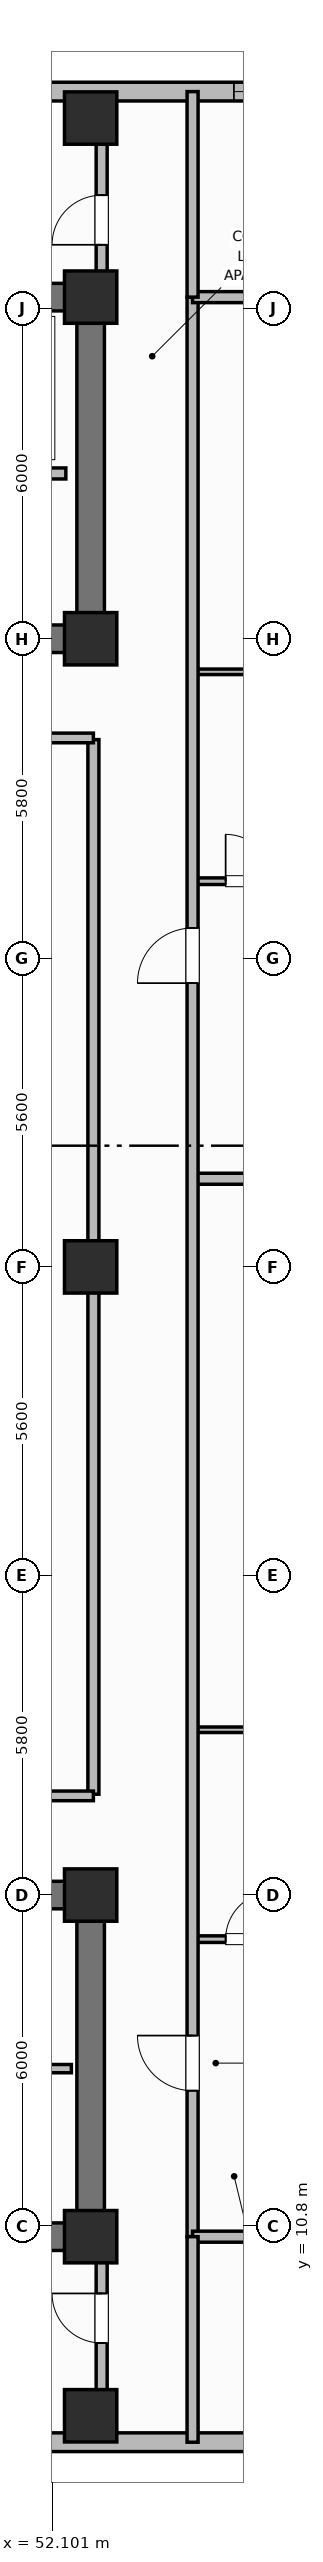
"""IFC4 building model, lengths in metres.
Left out: names, types, materials, properties, quantities, classifications, styles, units other than length and angle.
Written with IfcOpenShell. Run it as: python <this file> out.ifc"""

import sys

from ifc_helpers import new_model, si_unit, direction, frame, frame_2d, origin, origin_2d, place, context, subcontext, project, spatial, rectangle, extrude, element, fill, save


model = new_model("IFC4")
c1 = context("Model", 3, precision=1e-05, world=origin(), true_north=direction((0.0, 1.0)))
c2 = subcontext(c1, "Body", "Model", "MODEL_VIEW")
j1 = project(units=[si_unit("LENGTHUNIT", "METRE"), si_unit("PLANEANGLEUNIT", "RADIAN")], contexts=[c1])
p1 = place(None, origin())
s1 = spatial("IfcSite", under=j1, at=p1, CompositionType="ELEMENT")
p2 = place(p1, origin())
s2 = spatial("IfcBuilding", under=s1, at=p2, CompositionType="ELEMENT")
p3 = place(p2, frame((0.0, 0.0, 158.9)))
s3 = spatial("IfcBuildingStorey", under=s2, at=p3, CompositionType="ELEMENT", Elevation=158.9)
p4 = place(p3, frame((52.8, 10.6, 0.0), z_axis=(0.0, 0.0, 1.0), x_axis=(-1.0, 0.0, 0.0)))
e1 = element("IfcWall", 1, at=p4, inside=s3, PredefinedType="SHEAR", context=c2, shape_type="SweptSolid", body=[
    extrude(rectangle(XDim=27.2, YDim=0.5, at=frame_2d((13.6, 0.0))), origin(), (0.0, 0.0, 1.0), 3.7),
])
p5 = place(p3, frame((52.8, 10.85, 0.0), z_axis=(0.0, 0.0, 1.0), x_axis=(0.0, 1.0, 0.0)))
e2 = element("IfcWall", 2, at=p5, inside=s3, PredefinedType="SHEAR", context=c2, shape_type="SweptSolid", body=[
    extrude(rectangle(XDim=5.7, YDim=0.5, at=frame_2d((2.85, 0.0))), origin(), (0.0, 0.0, 1.0), 3.7),
])
p6 = place(p3, frame((25.6, 16.8, 0.0), z_axis=(0.0, 0.0, 1.0), x_axis=(1.0, 0.0, 0.0)))
e3 = element("IfcWall", 3, at=p6, inside=s3, PredefinedType="SHEAR", context=c2, shape_type="SweptSolid", body=[
    extrude(rectangle(XDim=27.2, YDim=0.5, at=frame_2d((13.6, 0.0))), origin(), (0.0, 0.0, 1.0), 3.7),
])
p7 = place(p6, frame((1.7, 0.0, 0.0)))
e4 = element("IfcOpeningElement", 4, at=p7, cuts=e3, PredefinedType="OPENING", context=c2, shape_type="SweptSolid", body=[
    extrude(rectangle(XDim=1.1, YDim=2.15, at=frame_2d((0.55, 1.075))), frame((0.0, 0.26, 0.0), z_axis=(0.0, -1.0, 0.0), x_axis=(1.0, 0.0, 0.0)), (0.0, 0.0, 1.0), 0.52),
])
p8 = place(p6, frame((4.45, 0.0, 0.0)))
e5 = element("IfcOpeningElement", 5, at=p8, cuts=e3, PredefinedType="OPENING", context=c2, shape_type="SweptSolid", body=[
    extrude(rectangle(XDim=0.85, YDim=2.1, at=frame_2d((0.425, 1.05))), frame((0.0, 0.26, 0.0), z_axis=(0.0, -1.0, 0.0), x_axis=(1.0, 0.0, 0.0)), (0.0, 0.0, 1.0), 0.52),
])
p9 = place(p6, frame((6.5, 0.0, 0.0)))
e6 = element("IfcOpeningElement", 6, at=p9, cuts=e3, PredefinedType="OPENING", context=c2, shape_type="SweptSolid", body=[
    extrude(rectangle(XDim=0.85, YDim=2.1, at=frame_2d((0.425, 1.05))), frame((0.0, 0.26, 0.0), z_axis=(0.0, -1.0, 0.0), x_axis=(1.0, 0.0, 0.0)), (0.0, 0.0, 1.0), 0.52),
])
p10 = place(p6, frame((13.0, 0.0, 0.0)))
e7 = element("IfcOpeningElement", 7, at=p10, cuts=e3, PredefinedType="OPENING", context=c2, shape_type="SweptSolid", body=[
    extrude(rectangle(XDim=1.2, YDim=2.15, at=frame_2d((0.6, 1.075))), frame((0.0, 0.26, 0.0), z_axis=(0.0, -1.0, 0.0), x_axis=(1.0, 0.0, 0.0)), (0.0, 0.0, 1.0), 0.52),
])
p11 = place(p6, frame((19.8, 0.0, 0.0)))
e8 = element("IfcOpeningElement", 8, at=p11, cuts=e3, PredefinedType="OPENING", context=c2, shape_type="SweptSolid", body=[
    extrude(rectangle(XDim=0.85, YDim=2.1, at=frame_2d((0.425, 1.05))), frame((0.0, 0.26, 0.0), z_axis=(0.0, -1.0, 0.0), x_axis=(1.0, 0.0, 0.0)), (0.0, 0.0, 1.0), 0.52),
])
p12 = place(p6, frame((24.2, 0.0, 0.0)))
e9 = element("IfcOpeningElement", 9, at=p12, cuts=e3, PredefinedType="OPENING", context=c2, shape_type="SweptSolid", body=[
    extrude(rectangle(XDim=0.85, YDim=2.1, at=frame_2d((0.425, 1.05))), frame((0.0, 0.26, 0.0), z_axis=(0.0, -1.0, 0.0), x_axis=(1.0, 0.0, 0.0)), (0.0, 0.0, 1.0), 0.52),
])
p13 = place(p3, frame((25.6, 45.8, 0.0), z_axis=(0.0, 0.0, 1.0), x_axis=(1.0, 0.0, 0.0)))
e10 = element("IfcWall", 10, at=p13, inside=s3, PredefinedType="SHEAR", context=c2, shape_type="SweptSolid", body=[
    extrude(rectangle(XDim=27.2, YDim=0.5, at=frame_2d((13.6, 0.0))), origin(), (0.0, 0.0, 1.0), 3.7),
])
p14 = place(p3, frame((52.8, 39.85, 0.0), z_axis=(0.0, 0.0, 1.0), x_axis=(0.0, 1.0, 0.0)))
e11 = element("IfcWall", 11, at=p14, inside=s3, PredefinedType="SHEAR", context=c2, shape_type="SweptSolid", body=[
    extrude(rectangle(XDim=5.7, YDim=0.5, at=frame_2d((2.85, 0.0))), origin(), (0.0, 0.0, 1.0), 3.7),
])
p15 = place(p3, frame((52.8, 39.6, 0.0), z_axis=(0.0, 0.0, 1.0), x_axis=(-1.0, 0.0, 0.0)))
e12 = element("IfcWall", 12, at=p15, inside=s3, PredefinedType="SHEAR", context=c2, shape_type="SweptSolid", body=[
    extrude(rectangle(XDim=27.2, YDim=0.5, at=frame_2d((13.6, 0.0))), origin(), (0.0, 0.0, 1.0), 3.7),
])
p16 = place(p15, frame((24.3, 0.0, 0.0)))
e13 = element("IfcOpeningElement", 13, at=p16, cuts=e12, PredefinedType="OPENING", context=c2, shape_type="SweptSolid", body=[
    extrude(rectangle(XDim=1.1, YDim=2.15, at=frame_2d((0.55, 1.075))), frame((0.0, 0.26, 0.0), z_axis=(0.0, -1.0, 0.0), x_axis=(1.0, 0.0, 0.0)), (0.0, 0.0, 1.0), 0.52),
])
p17 = place(p15, frame((21.85, 0.0, 0.0)))
e14 = element("IfcOpeningElement", 14, at=p17, cuts=e12, PredefinedType="OPENING", context=c2, shape_type="SweptSolid", body=[
    extrude(rectangle(XDim=0.85, YDim=2.1, at=frame_2d((0.425, 1.05))), frame((0.0, 0.26, 0.0), z_axis=(0.0, -1.0, 0.0), x_axis=(1.0, 0.0, 0.0)), (0.0, 0.0, 1.0), 0.52),
])
p18 = place(p15, frame((19.85, 0.0, 0.0)))
e15 = element("IfcOpeningElement", 15, at=p18, cuts=e12, PredefinedType="OPENING", context=c2, shape_type="SweptSolid", body=[
    extrude(rectangle(XDim=0.85, YDim=2.1, at=frame_2d((0.425, 1.05))), frame((0.0, 0.26, 0.0), z_axis=(0.0, -1.0, 0.0), x_axis=(1.0, 0.0, 0.0)), (0.0, 0.0, 1.0), 0.52),
])
p19 = place(p15, frame((15.1, 0.0, 0.0)))
e16 = element("IfcOpeningElement", 16, at=p19, cuts=e12, PredefinedType="OPENING", context=c2, shape_type="SweptSolid", body=[
    extrude(rectangle(XDim=1.2, YDim=2.15, at=frame_2d((0.6, 1.075))), frame((0.0, 0.26, 0.0), z_axis=(0.0, -1.0, 0.0), x_axis=(1.0, 0.0, 0.0)), (0.0, 0.0, 1.0), 0.52),
])
p20 = place(p15, frame((12.6, 0.0, 0.0)))
e17 = element("IfcOpeningElement", 17, at=p20, cuts=e12, PredefinedType="OPENING", context=c2, shape_type="SweptSolid", body=[
    extrude(rectangle(XDim=0.85, YDim=2.1, at=frame_2d((0.425, 1.05))), frame((0.0, 0.26, 0.0), z_axis=(0.0, -1.0, 0.0), x_axis=(1.0, 0.0, 0.0)), (0.0, 0.0, 1.0), 0.52),
])
p21 = place(p15, frame((10.85, 0.0, 0.0)))
e18 = element("IfcOpeningElement", 18, at=p21, cuts=e12, PredefinedType="OPENING", context=c2, shape_type="SweptSolid", body=[
    extrude(rectangle(XDim=0.85, YDim=2.1, at=frame_2d((0.425, 1.05))), frame((0.0, 0.26, 0.0), z_axis=(0.0, -1.0, 0.0), x_axis=(1.0, 0.0, 0.0)), (0.0, 0.0, 1.0), 0.52),
])
p22 = place(p15, frame((7.35, 0.0, 0.0)))
e19 = element("IfcOpeningElement", 19, at=p22, cuts=e12, PredefinedType="OPENING", context=c2, shape_type="SweptSolid", body=[
    extrude(rectangle(XDim=0.85, YDim=2.1, at=frame_2d((0.425, 1.05))), frame((0.0, 0.26, 0.0), z_axis=(0.0, -1.0, 0.0), x_axis=(1.0, 0.0, 0.0)), (0.0, 0.0, 1.0), 0.52),
])
p23 = place(p15, frame((5.35, 0.0, 0.0)))
e20 = element("IfcOpeningElement", 20, at=p23, cuts=e12, PredefinedType="OPENING", context=c2, shape_type="SweptSolid", body=[
    extrude(rectangle(XDim=0.85, YDim=2.1, at=frame_2d((0.425, 1.05))), frame((0.0, 0.26, 0.0), z_axis=(0.0, -1.0, 0.0), x_axis=(1.0, 0.0, 0.0)), (0.0, 0.0, 1.0), 0.52),
])
p24 = place(p15, frame((2.0, 0.0, 0.0)))
e21 = element("IfcOpeningElement", 21, at=p24, cuts=e12, PredefinedType="OPENING", context=c2, shape_type="SweptSolid", body=[
    extrude(rectangle(XDim=0.85, YDim=2.1, at=frame_2d((0.425, 1.05))), frame((0.0, 0.26, 0.0), z_axis=(0.0, -1.0, 0.0), x_axis=(1.0, 0.0, 0.0)), (0.0, 0.0, 1.0), 0.52),
])
for number, where, z_axis, x_axis in (
    (22, (52.8, 10.6, 0.0), (0.0, 0.0, 1.0), (1.0, 0.0, 0.0)),
    (23, (52.8, 16.8, 0.0), (0.0, 0.0, 1.0), (1.0, 0.0, 0.0)),
    (24, (52.8, 39.6, 0.0), (0.0, 0.0, 1.0), (1.0, 0.0, 0.0)),
    (25, (52.8, 45.8, 0.0), (0.0, 0.0, 1.0), (1.0, 0.0, 0.0)),
    (26, (52.8, 28.2, 0.0), (0.0, 0.0, 1.0), (1.0, 0.0, 0.0)),
    (27, (52.8, 7.35, 0.0), (0.0, 0.0, 1.0), (1.0, 0.0, 0.0)),
    (28, (52.8, 49.05, 0.0), (0.0, 0.0, 1.0), (1.0, 0.0, 0.0)),
):
    element("IfcColumn", number, at=place(p3, frame(where, z_axis=z_axis, x_axis=x_axis)), inside=s3, PredefinedType="COLUMN", context=c2, shape_type="SweptSolid", body=[
        extrude(rectangle(XDim=0.95, YDim=0.95, at=origin_2d()), origin(), (0.0, 0.0, 1.0), 3.7),
    ])
p25 = place(p3, frame((51.25, 6.87, 0.0), z_axis=(0.0, 0.0, 1.0), x_axis=(1.0, 0.0, 0.0)))
e29 = element("IfcWall", 29, at=p25, inside=s3, PredefinedType="SOLIDWALL", context=c2, shape_type="SweptSolid", body=[
    extrude(rectangle(XDim=6.95, YDim=0.34, at=frame_2d((3.475, 0.0))), origin(), (0.0, 0.0, 1.0), 2.72),
])
p26 = place(p3, frame((58.2, 49.53, 0.0), z_axis=(0.0, 0.0, 1.0), x_axis=(-1.0, 0.0, 0.0)))
e30 = element("IfcWall", 30, at=p26, inside=s3, PredefinedType="SOLIDWALL", context=c2, shape_type="SweptSolid", body=[
    extrude(rectangle(XDim=15.8, YDim=0.34, at=frame_2d((7.9, 0.0))), origin(), (0.0, 0.0, 1.0), 2.72),
])
p27 = place(p26, frame((1.4, 0.0, 0.75)))
e31 = element("IfcOpeningElement", 31, at=p27, cuts=e30, PredefinedType="OPENING", context=c2, shape_type="SweptSolid", body=[
    extrude(rectangle(XDim=1.4, YDim=1.85, at=frame_2d((0.7, 0.925))), frame((0.0, 0.18, 0.0), z_axis=(0.0, -1.0, 0.0), x_axis=(1.0, 0.0, 0.0)), (0.0, 0.0, 1.0), 0.36),
])
p28 = place(p26, frame((7.2, 0.0, 0.75)))
e32 = element("IfcOpeningElement", 32, at=p28, cuts=e30, PredefinedType="OPENING", context=c2, shape_type="SweptSolid", body=[
    extrude(rectangle(XDim=1.4, YDim=1.85, at=frame_2d((0.7, 0.925))), frame((0.0, 0.18, 0.0), z_axis=(0.0, -1.0, 0.0), x_axis=(1.0, 0.0, 0.0)), (0.0, 0.0, 1.0), 0.36),
])
p29 = place(p26, frame((11.15, 0.0, 0.75)))
e33 = element("IfcOpeningElement", 33, at=p29, cuts=e30, PredefinedType="OPENING", context=c2, shape_type="SweptSolid", body=[
    extrude(rectangle(XDim=1.4, YDim=1.85, at=frame_2d((0.7, 0.925))), frame((0.0, 0.18, 0.0), z_axis=(0.0, -1.0, 0.0), x_axis=(1.0, 0.0, 0.0)), (0.0, 0.0, 1.0), 0.36),
])
p30 = place(p3, frame((48.05, 13.65, 0.0), z_axis=(0.0, 0.0, 1.0), x_axis=(1.0, 0.0, 0.0)))
e34 = element("IfcWall", 34, at=p30, inside=s3, PredefinedType="PARTITIONING", context=c2, shape_type="SweptSolid", body=[
    extrude(rectangle(XDim=4.4, YDim=0.15, at=frame_2d((2.2, 0.0))), origin(), (0.0, 0.0, 1.0), 2.55),
])
p31 = place(p30, frame((1.6, 0.0, 0.0)))
e35 = element("IfcOpeningElement", 35, at=p31, cuts=e34, PredefinedType="OPENING", context=c2, shape_type="SweptSolid", body=[
    extrude(rectangle(XDim=0.85, YDim=2.1, at=frame_2d((0.425, 1.05))), frame((0.0, 0.085, 0.0), z_axis=(0.0, -1.0, 0.0), x_axis=(1.0, 0.0, 0.0)), (0.0, 0.0, 1.0), 0.17),
])
p32 = place(p3, frame((52.35, 42.6, 0.0), z_axis=(0.0, 0.0, 1.0), x_axis=(-1.0, 0.0, 0.0)))
e36 = element("IfcWall", 36, at=p32, inside=s3, PredefinedType="PARTITIONING", context=c2, shape_type="SweptSolid", body=[
    extrude(rectangle(XDim=6.5, YDim=0.2, at=frame_2d((3.25, 0.0))), origin(), (0.0, 0.0, 1.0), 2.55),
])
p33 = place(p3, frame((52.85, 18.63, 0.0), z_axis=(0.0, 0.0, 1.0), x_axis=(0.0, 1.0, 0.0)))
e37 = element("IfcWall", 37, at=p33, inside=s3, PredefinedType="PARTITIONING", context=c2, shape_type="SweptSolid", body=[
    extrude(rectangle(XDim=19.14, YDim=0.2, at=frame_2d((9.57, 0.0))), origin(), (0.0, 0.0, 1.0), 2.55),
])
for number, where, z_axis, x_axis in (
    (38, (31.35, 18.6, 0.0), (0.0, 0.0, 1.0), (1.0, 0.0, 0.0)),
    (39, (31.35, 37.8, 0.0), (0.0, 0.0, 1.0), (1.0, 0.0, 0.0)),
):
    element("IfcWall", number, at=place(p3, frame(where, z_axis=z_axis, x_axis=x_axis)), inside=s3, PredefinedType="PARTITIONING", context=c2, shape_type="SweptSolid", body=[
        extrude(rectangle(XDim=21.5, YDim=0.175, at=frame_2d((10.75, 0.0))), origin(), (0.0, 0.0, 1.0), 2.55),
    ])
p34 = place(p3, frame((54.65, 16.0, 0.0), z_axis=(0.0, 0.0, 1.0), x_axis=(1.0, 0.0, 0.0)))
e40 = element("IfcWall", 40, at=p34, inside=s3, PredefinedType="PARTITIONING", context=c2, shape_type="SweptSolid", body=[
    extrude(rectangle(XDim=2.25, YDim=0.12, at=frame_2d((1.125, 0.0))), origin(), (0.0, 0.0, 1.0), 2.55),
])
p35 = place(p34, frame((0.6, 0.0, 0.0)))
e41 = element("IfcOpeningElement", 41, at=p35, cuts=e40, PredefinedType="OPENING", context=c2, shape_type="SweptSolid", body=[
    extrude(rectangle(XDim=0.85, YDim=2.1, at=frame_2d((0.425, 1.05))), frame((0.0, 0.07, 0.0), z_axis=(0.0, -1.0, 0.0), x_axis=(1.0, 0.0, 0.0)), (0.0, 0.0, 1.0), 0.14),
])
p36 = place(p3, frame((54.65, 19.8, 0.0), z_axis=(0.0, 0.0, 1.0), x_axis=(1.0, 0.0, 0.0)))
e42 = element("IfcWall", 42, at=p36, inside=s3, PredefinedType="PARTITIONING", context=c2, shape_type="SweptSolid", body=[
    extrude(rectangle(XDim=2.25, YDim=0.1, at=frame_2d((1.125, 0.0))), origin(), (0.0, 0.0, 1.0), 2.55),
])
p37 = place(p3, frame((54.65, 29.8, 0.0), z_axis=(0.0, 0.0, 1.0), x_axis=(1.0, 0.0, 0.0)))
e43 = element("IfcWall", 43, at=p37, inside=s3, PredefinedType="PARTITIONING", context=c2, shape_type="SweptSolid", body=[
    extrude(rectangle(XDim=6.666, YDim=0.2, at=frame_2d((3.333, 0.0))), origin(), (0.0, 0.0, 1.0), 2.55),
])
p38 = place(p3, frame((54.65, 35.2, 0.0), z_axis=(0.0, 0.0, 1.0), x_axis=(1.0, 0.0, 0.0)))
e44 = element("IfcWall", 44, at=p38, inside=s3, PredefinedType="PARTITIONING", context=c2, shape_type="SweptSolid", body=[
    extrude(rectangle(XDim=2.25, YDim=0.12, at=frame_2d((1.125, 0.0))), origin(), (0.0, 0.0, 1.0), 2.55),
])
p39 = place(p38, frame((0.6, 0.0, 0.0)))
e45 = element("IfcOpeningElement", 45, at=p39, cuts=e44, PredefinedType="OPENING", context=c2, shape_type="SweptSolid", body=[
    extrude(rectangle(XDim=0.85, YDim=2.1, at=frame_2d((0.425, 1.05))), frame((0.0, 0.07, 0.0), z_axis=(0.0, -1.0, 0.0), x_axis=(1.0, 0.0, 0.0)), (0.0, 0.0, 1.0), 0.14),
])
p40 = place(p3, frame((54.65, 39.0, 0.0), z_axis=(0.0, 0.0, 1.0), x_axis=(1.0, 0.0, 0.0)))
e46 = element("IfcWall", 46, at=p40, inside=s3, PredefinedType="PARTITIONING", context=c2, shape_type="SweptSolid", body=[
    extrude(rectangle(XDim=2.25, YDim=0.1, at=frame_2d((1.125, 0.0))), origin(), (0.0, 0.0, 1.0), 2.55),
])
p41 = place(p3, frame((54.65, 10.6, 0.0), z_axis=(0.0, 0.0, 1.0), x_axis=(0.0, 1.0, 0.0)))
e47 = element("IfcWall", 47, at=p41, inside=s3, PredefinedType="PARTITIONING", context=c2, shape_type="SweptSolid", body=[
    extrude(rectangle(XDim=35.2, YDim=0.2, at=frame_2d((17.6, 0.0))), origin(), (0.0, 0.0, 1.0), 2.55),
])
p42 = place(p41, frame((2.65, 0.0, 0.0)))
e48 = element("IfcOpeningElement", 48, at=p42, cuts=e47, PredefinedType="OPENING", context=c2, shape_type="SweptSolid", body=[
    extrude(rectangle(XDim=1.0, YDim=2.15, at=frame_2d((0.5, 1.075))), frame((0.0, 0.11, 0.0), z_axis=(0.0, -1.0, 0.0), x_axis=(1.0, 0.0, 0.0)), (0.0, 0.0, 1.0), 0.22),
])
p43 = place(p41, frame((22.75, 0.0, 0.0)))
e49 = element("IfcOpeningElement", 49, at=p43, cuts=e47, PredefinedType="OPENING", context=c2, shape_type="SweptSolid", body=[
    extrude(rectangle(XDim=1.0, YDim=2.15, at=frame_2d((0.5, 1.075))), frame((0.0, 0.11, 0.0), z_axis=(0.0, -1.0, 0.0), x_axis=(1.0, 0.0, 0.0)), (0.0, 0.0, 1.0), 0.22),
])
for number, where, z_axis, x_axis in (
    (50, (54.65, 10.6, 0.0), (0.0, 0.0, 1.0), (1.0, 0.0, 0.0)),
    (51, (54.65, 45.8, 0.0), (0.0, 0.0, 1.0), (1.0, 0.0, 0.0)),
):
    element("IfcWall", number, at=place(p3, frame(where, z_axis=z_axis, x_axis=x_axis)), inside=s3, PredefinedType="PARTITIONING", context=c2, shape_type="SweptSolid", body=[
        extrude(rectangle(XDim=6.76, YDim=0.2, at=frame_2d((3.38, 0.0))), origin(), (0.0, 0.0, 1.0), 2.55),
    ])
for number, where, z_axis, x_axis in (
    (52, (54.65, 6.87, 0.0), (0.0, 0.0, 1.0), (0.0, 1.0, 0.0)),
    (53, (54.65, 45.8, 0.0), (0.0, 0.0, 1.0), (0.0, 1.0, 0.0)),
):
    element("IfcWall", number, at=place(p3, frame(where, z_axis=z_axis, x_axis=x_axis)), inside=s3, PredefinedType="PARTITIONING", context=c2, shape_type="SweptSolid", body=[
        extrude(rectangle(XDim=3.73, YDim=0.2, at=frame_2d((1.865, 0.0))), origin(), (0.0, 0.0, 1.0), 2.55),
    ])
p44 = place(p3, frame((53.0, 7.82, 0.0), z_axis=(0.0, 0.0, 1.0), x_axis=(0.0, 1.0, 0.0)))
e54 = element("IfcWall", 54, at=p44, inside=s3, PredefinedType="PARTITIONING", context=c2, shape_type="SweptSolid", body=[
    extrude(rectangle(XDim=2.48, YDim=0.2, at=frame_2d((1.24, 0.0))), origin(), (0.0, 0.0, 1.0), 2.55),
])
p45 = place(p44, frame((0.85, 0.0, 0.0)))
e55 = element("IfcOpeningElement", 55, at=p45, cuts=e54, PredefinedType="OPENING", context=c2, shape_type="SweptSolid", body=[
    extrude(rectangle(XDim=0.9, YDim=2.1, at=frame_2d((0.45, 1.05))), frame((0.0, 0.11, 0.0), z_axis=(0.0, -1.0, 0.0), x_axis=(1.0, 0.0, 0.0)), (0.0, 0.0, 1.0), 0.22),
])
p46 = place(p3, frame((53.0, 46.1, 0.0), z_axis=(0.0, 0.0, 1.0), x_axis=(0.0, 1.0, 0.0)))
e56 = element("IfcWall", 56, at=p46, inside=s3, PredefinedType="PARTITIONING", context=c2, shape_type="SweptSolid", body=[
    extrude(rectangle(XDim=2.48, YDim=0.2, at=frame_2d((1.24, 0.0))), origin(), (0.0, 0.0, 1.0), 2.55),
])
p47 = place(p46, frame((0.65, 0.0, 0.0)))
e57 = element("IfcOpeningElement", 57, at=p47, cuts=e56, PredefinedType="OPENING", context=c2, shape_type="SweptSolid", body=[
    extrude(rectangle(XDim=0.9, YDim=2.1, at=frame_2d((0.45, 1.05))), frame((0.0, 0.11, 0.0), z_axis=(0.0, -1.0, 0.0), x_axis=(1.0, 0.0, 0.0)), (0.0, 0.0, 1.0), 0.22),
])
p48 = place(p27, origin())
e58 = element("IfcWindow", 58, at=p48, inside=s3, PartitioningType="SINGLE_PANEL", PredefinedType="WINDOW", context=c2, shape_type="SweptSolid", body=[
    extrude(rectangle(XDim=1.4, YDim=1.85, at=frame_2d((0.7, 0.925))), frame((0.0, 0.03, 0.0), z_axis=(0.0, -1.0, 0.0), x_axis=(1.0, 0.0, 0.0)), (0.0, 0.0, 1.0), 0.06),
])
fill(e31, e58)
p49 = place(p35, origin())
e59 = element("IfcDoor", 59, at=p49, inside=s3, OperationType="SINGLE_SWING_RIGHT", PredefinedType="DOOR", context=c2, shape_type="SweptSolid", body=[
    extrude(rectangle(XDim=0.85, YDim=2.1, at=frame_2d((0.425, 1.05))), frame((0.0, 0.025, 0.0), z_axis=(0.0, -1.0, 0.0), x_axis=(1.0, 0.0, 0.0)), (0.0, 0.0, 1.0), 0.05),
])
fill(e41, e59)
p50 = place(p39, origin())
e60 = element("IfcDoor", 60, at=p50, inside=s3, OperationType="SINGLE_SWING_LEFT", PredefinedType="DOOR", context=c2, shape_type="SweptSolid", body=[
    extrude(rectangle(XDim=0.85, YDim=2.1, at=frame_2d((0.425, 1.05))), frame((0.0, 0.025, 0.0), z_axis=(0.0, -1.0, 0.0), x_axis=(1.0, 0.0, 0.0)), (0.0, 0.0, 1.0), 0.05),
])
fill(e45, e60)
p51 = place(p42, origin())
e61 = element("IfcDoor", 61, at=p51, inside=s3, OperationType="SINGLE_SWING_RIGHT", PredefinedType="DOOR", context=c2, shape_type="SweptSolid", body=[
    extrude(rectangle(XDim=1.0, YDim=2.15, at=frame_2d((0.5, 1.075))), frame((0.0, 0.025, 0.0), z_axis=(0.0, -1.0, 0.0), x_axis=(1.0, 0.0, 0.0)), (0.0, 0.0, 1.0), 0.05),
])
fill(e48, e61)
p52 = place(p43, origin())
e62 = element("IfcDoor", 62, at=p52, inside=s3, OperationType="SINGLE_SWING_LEFT", PredefinedType="DOOR", context=c2, shape_type="SweptSolid", body=[
    extrude(rectangle(XDim=1.0, YDim=2.15, at=frame_2d((0.5, 1.075))), frame((0.0, 0.025, 0.0), z_axis=(0.0, -1.0, 0.0), x_axis=(1.0, 0.0, 0.0)), (0.0, 0.0, 1.0), 0.05),
])
fill(e49, e62)
p53 = place(p45, origin())
e63 = element("IfcDoor", 63, at=p53, inside=s3, OperationType="SINGLE_SWING_RIGHT", PredefinedType="DOOR", context=c2, shape_type="SweptSolid", body=[
    extrude(rectangle(XDim=0.9, YDim=2.1, at=frame_2d((0.45, 1.05))), frame((0.0, 0.025, 0.0), z_axis=(0.0, -1.0, 0.0), x_axis=(1.0, 0.0, 0.0)), (0.0, 0.0, 1.0), 0.05),
])
fill(e55, e63)
p54 = place(p47, origin())
e64 = element("IfcDoor", 64, at=p54, inside=s3, OperationType="SINGLE_SWING_LEFT", PredefinedType="DOOR", context=c2, shape_type="SweptSolid", body=[
    extrude(rectangle(XDim=0.9, YDim=2.1, at=frame_2d((0.45, 1.05))), frame((0.0, 0.025, 0.0), z_axis=(0.0, -1.0, 0.0), x_axis=(1.0, 0.0, 0.0)), (0.0, 0.0, 1.0), 0.05),
])
fill(e57, e64)
save(model, sys.argv[1])
